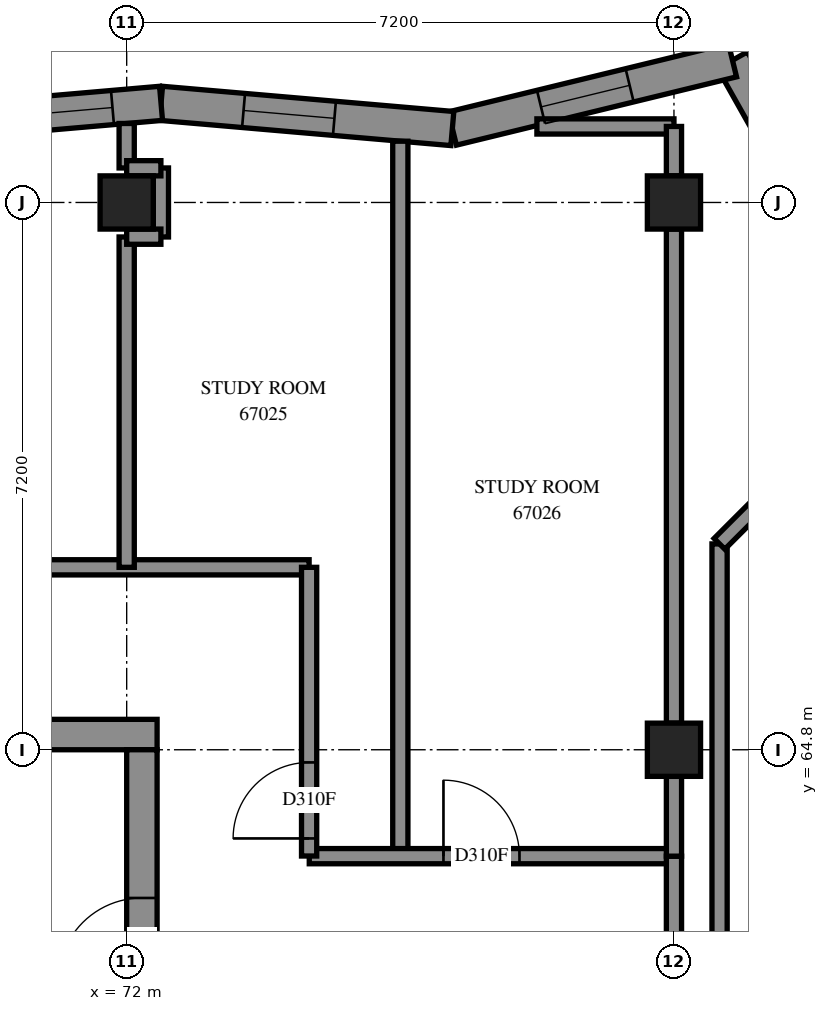
"""IFC4 building model, lengths in metres.
Left out: names, types, materials, properties, quantities, classifications, styles, units other than length and angle.
Written with IfcOpenShell. Run it as: python <this file> out.ifc"""

import sys

from ifc_helpers import new_model, si_unit, direction, frame, frame_2d, origin, origin_2d, place, context, subcontext, project, spatial, polyline, rectangle, outline, extrude, element, fill, save


model = new_model("IFC4")
c1 = context("Model", 3, precision=1e-05, world=origin(), true_north=direction((0.0, 1.0)))
c2 = subcontext(c1, "Body", "Model", "MODEL_VIEW")
j1 = project(units=[si_unit("LENGTHUNIT", "METRE"), si_unit("PLANEANGLEUNIT", "RADIAN")], contexts=[c1])
p1 = place(None, origin())
s1 = spatial("IfcSite", under=j1, at=p1, CompositionType="ELEMENT")
p2 = place(p1, origin())
s2 = spatial("IfcBuilding", under=s1, at=p2, CompositionType="ELEMENT")
p3 = place(p2, frame((0.0, 0.0, 247.2)))
s3 = spatial("IfcBuildingStorey", under=s2, at=p3, CompositionType="ELEMENT", Elevation=247.2)
for number, where, z_axis, x_axis in (
    (1, (72.0, 72.0, 0.0), (0.0, 0.0, 1.0), (1.0, 0.0, 0.0)),
    (2, (79.2, 64.8, 0.0), (0.0, 0.0, 1.0), (1.0, 0.0, 0.0)),
    (3, (79.2, 72.0, 0.0), (0.0, 0.0, 1.0), (1.0, 0.0, 0.0)),
):
    element("IfcColumn", number, at=place(p3, frame(where, z_axis=z_axis, x_axis=x_axis)), inside=s3, PredefinedType="COLUMN", context=c2, shape_type="SweptSolid", body=[
        extrude(rectangle(XDim=0.7, YDim=0.7, at=origin_2d()), origin(), (0.0, 0.0, 1.0), 3.1),
    ])
p4 = place(p3, frame((57.2, 65.0, -0.3), z_axis=(0.0, 0.0, 1.0), x_axis=(1.0, 0.0, 0.0)))
e4 = element("IfcWall", 4, at=p4, inside=s3, PredefinedType="SHEAR", context=c2, shape_type="SweptSolid", body=[
    extrude(rectangle(XDim=15.2, YDim=0.4, at=frame_2d((7.6, 0.0))), origin(), (0.0, 0.0, 1.0), 2.7),
])
p5 = place(p4, frame((10.4, 0.0, 0.3)))
e5 = element("IfcOpeningElement", 5, at=p5, cuts=e4, PredefinedType="OPENING", context=c2, shape_type="SweptSolid", body=[
    extrude(rectangle(XDim=0.8, YDim=2.1, at=frame_2d((0.4, 1.05))), frame((0.0, 0.21, 0.0), z_axis=(0.0, -1.0, 0.0), x_axis=(1.0, 0.0, 0.0)), (0.0, 0.0, 1.0), 0.42),
])
p6 = place(p3, frame((72.2, 50.4, -0.3), z_axis=(0.0, 0.0, 1.0), x_axis=(0.0, 1.0, 0.0)))
e6 = element("IfcWall", 6, at=p6, inside=s3, PredefinedType="SHEAR", context=c2, shape_type="SweptSolid", body=[
    extrude(rectangle(XDim=14.4, YDim=0.4, at=frame_2d((7.2, 0.0))), origin(), (0.0, 0.0, 1.0), 2.7),
])
p7 = place(p6, frame((4.55, 0.0, 0.3)))
e7 = element("IfcOpeningElement", 7, at=p7, cuts=e6, PredefinedType="OPENING", context=c2, shape_type="SweptSolid", body=[
    extrude(rectangle(XDim=1.1, YDim=2.1, at=frame_2d((0.55, 1.05))), frame((0.0, 0.21, 0.0), z_axis=(0.0, -1.0, 0.0), x_axis=(1.0, 0.0, 0.0)), (0.0, 0.0, 1.0), 0.42),
])
p8 = place(p6, frame((11.35, 0.0, 0.3)))
e8 = element("IfcOpeningElement", 8, at=p8, cuts=e6, PredefinedType="OPENING", context=c2, shape_type="SweptSolid", body=[
    extrude(rectangle(XDim=1.1, YDim=2.1, at=frame_2d((0.55, 1.05))), frame((0.0, 0.21, 0.0), z_axis=(0.0, -1.0, 0.0), x_axis=(1.0, 0.0, 0.0)), (0.0, 0.0, 1.0), 0.42),
])
p9 = place(p3, frame((81.603, 70.972, 0.0), z_axis=(0.0, 0.0, 1.0), x_axis=(-0.4907277416, 0.8713129654, 0.0)))
e9 = element("IfcWall", 9, at=p9, inside=s3, PredefinedType="SOLIDWALL", context=c2, shape_type="SweptSolid", body=[
    extrude(outline(polyline([(0.042, -0.225), (3.498, -0.225), (3.157, 0.225), (-0.042, 0.225), (0.042, -0.225)])), origin(), (0.0, 0.0, 1.0), 3.1),
])
p10 = place(p9, frame((0.759, 0.0, 0.45)))
e10 = element("IfcOpeningElement", 10, at=p10, cuts=e9, PredefinedType="OPENING", context=c2, shape_type="SweptSolid", body=[
    extrude(rectangle(XDim=1.2, YDim=2.55, at=frame_2d((0.6, 1.275))), frame((0.0, 0.235, 0.0), z_axis=(0.0, -1.0, 0.0), x_axis=(1.0, 0.0, 0.0)), (0.0, 0.0, 1.0), 0.47),
])
p11 = place(p3, frame((79.97, 73.871, 0.0), z_axis=(0.0, 0.0, 1.0), x_axis=(-0.9715539303, -0.2368184125, 0.0)))
e11 = element("IfcWall", 11, at=p11, inside=s3, PredefinedType="SOLIDWALL", context=c2, shape_type="SweptSolid", body=[
    extrude(outline(polyline([(-0.171, -0.225), (3.756, -0.225), (3.83, 0.225), (0.171, 0.225), (-0.171, -0.225)])), origin(), (0.0, 0.0, 1.0), 3.1),
])
p12 = place(p11, frame((1.393, 0.0, 0.45)))
e12 = element("IfcOpeningElement", 12, at=p12, cuts=e11, PredefinedType="OPENING", context=c2, shape_type="SweptSolid", body=[
    extrude(rectangle(XDim=1.2, YDim=2.55, at=frame_2d((0.6, 1.275))), frame((0.0, 0.235, 0.0), z_axis=(0.0, -1.0, 0.0), x_axis=(1.0, 0.0, 0.0)), (0.0, 0.0, 1.0), 0.47),
])
p13 = place(p3, frame((76.285, 72.973, 0.0), z_axis=(0.0, 0.0, 1.0), x_axis=(-0.9962801831, 0.0861730629, 0.0)))
e13 = element("IfcWall", 13, at=p13, inside=s3, PredefinedType="SOLIDWALL", context=c2, shape_type="SweptSolid", body=[
    extrude(outline(polyline([(0.037, -0.225), (3.866, -0.225), (3.827, 0.225), (-0.037, 0.225), (0.037, -0.225)])), origin(), (0.0, 0.0, 1.0), 3.1),
])
p14 = place(p13, frame((1.557, 0.0, 0.45)))
e14 = element("IfcOpeningElement", 14, at=p14, cuts=e13, PredefinedType="OPENING", context=c2, shape_type="SweptSolid", body=[
    extrude(rectangle(XDim=1.2, YDim=2.55, at=frame_2d((0.6, 1.275))), frame((0.0, 0.235, 0.0), z_axis=(0.0, -1.0, 0.0), x_axis=(1.0, 0.0, 0.0)), (0.0, 0.0, 1.0), 0.47),
])
p15 = place(p3, frame((72.452, 73.304, 0.0), z_axis=(0.0, 0.0, 1.0), x_axis=(-0.9962800708, -0.0861743613, 0.0)))
e15 = element("IfcWall", 15, at=p15, inside=s3, PredefinedType="SOLIDWALL", context=c2, shape_type="SweptSolid", body=[
    extrude(outline(polyline([(-0.019, -0.225), (3.81, -0.225), (3.849, 0.225), (0.019, 0.225), (-0.019, -0.225)])), origin(), (0.0, 0.0, 1.0), 3.1),
])
p16 = place(p15, frame((0.641, 0.0, 0.45)))
e16 = element("IfcOpeningElement", 16, at=p16, cuts=e15, PredefinedType="OPENING", context=c2, shape_type="SweptSolid", body=[
    extrude(rectangle(XDim=2.8, YDim=2.55, at=frame_2d((1.4, 1.275))), frame((0.0, 0.235, 0.0), z_axis=(0.0, -1.0, 0.0), x_axis=(1.0, 0.0, 0.0)), (0.0, 0.0, 1.0), 0.47),
])
p17 = place(p3, frame((55.2, 67.2, 0.0), z_axis=(0.0, 0.0, 1.0), x_axis=(1.0, 0.0, 0.0)))
e17 = element("IfcWall", 17, at=p17, inside=s3, PredefinedType="PARTITIONING", context=c2, shape_type="SweptSolid", body=[
    extrude(rectangle(XDim=19.2, YDim=0.2, at=frame_2d((9.6, 0.0))), origin(), (0.0, 0.0, 1.0), 3.1),
])
p18 = place(p17, frame((6.299, 0.0, 0.0)))
e18 = element("IfcOpeningElement", 18, at=p18, cuts=e17, PredefinedType="OPENING", context=c2, shape_type="SweptSolid", body=[
    extrude(rectangle(XDim=0.9, YDim=2.1, at=frame_2d((0.45, 1.05))), frame((0.0, 0.11, 0.0), z_axis=(0.0, -1.0, 0.0), x_axis=(1.0, 0.0, 0.0)), (0.0, 0.0, 1.0), 0.22),
])
p19 = place(p17, frame((13.65, 0.0, 0.0)))
e19 = element("IfcOpeningElement", 19, at=p19, cuts=e17, PredefinedType="OPENING", context=c2, shape_type="SweptSolid", body=[
    extrude(rectangle(XDim=0.9, YDim=2.1, at=frame_2d((0.45, 1.05))), frame((0.0, 0.11, 0.0), z_axis=(0.0, -1.0, 0.0), x_axis=(1.0, 0.0, 0.0)), (0.0, 0.0, 1.0), 0.22),
])
p20 = place(p3, frame((79.8, 55.844, 0.0), z_axis=(0.0, 0.0, 1.0), x_axis=(0.0, 1.0, 0.0)))
e20 = element("IfcWall", 20, at=p20, inside=s3, PredefinedType="PARTITIONING", context=c2, shape_type="SweptSolid", body=[
    extrude(rectangle(XDim=11.664, YDim=0.2, at=frame_2d((5.832, 0.0))), origin(), (0.0, 0.0, 1.0), 3.1),
])
p21 = place(p3, frame((79.907, 55.739, 0.0), z_axis=(0.0, 0.0, 1.0), x_axis=(0.7071067812, 0.7071067812, 0.0)))
e21 = element("IfcWall", 21, at=p21, inside=s3, PredefinedType="PARTITIONING", context=c2, shape_type="SweptSolid", body=[
    extrude(rectangle(XDim=9.798, YDim=0.2, at=frame_2d((4.899, 0.0))), origin(), (0.0, 0.0, 1.0), 3.1),
])
p22 = place(p21, frame((0.617, 0.0, 0.0)))
e22 = element("IfcOpeningElement", 22, at=p22, cuts=e21, PredefinedType="OPENING", context=c2, shape_type="SweptSolid", body=[
    extrude(rectangle(XDim=1.0, YDim=2.1, at=frame_2d((0.5, 1.05))), frame((0.0, 0.11, 0.0), z_axis=(0.0, -1.0, 0.0), x_axis=(1.0, 0.0, 0.0)), (0.0, 0.0, 1.0), 0.22),
])
p23 = place(p3, frame((75.6, 63.4, 0.0), z_axis=(0.0, 0.0, 1.0), x_axis=(0.0, 1.0, 0.0)))
e23 = element("IfcWall", 23, at=p23, inside=s3, PredefinedType="PARTITIONING", context=c2, shape_type="SweptSolid", body=[
    extrude(rectangle(XDim=9.406, YDim=0.2, at=frame_2d((4.703, 0.0))), origin(), (0.0, 0.0, 1.0), 3.1),
])
p24 = place(p3, frame((79.2, 65.15, 0.0), z_axis=(0.0, 0.0, 1.0), x_axis=(0.0, 1.0, 0.0)))
e24 = element("IfcWall", 24, at=p24, inside=s3, PredefinedType="PARTITIONING", context=c2, shape_type="SweptSolid", body=[
    extrude(rectangle(XDim=6.5, YDim=0.2, at=frame_2d((3.25, 0.0))), origin(), (0.0, 0.0, 1.0), 3.1),
])
p25 = place(p3, frame((74.402, 63.4, 0.0), z_axis=(0.0, 0.0, 1.0), x_axis=(1.0, 0.0, 0.0)))
e25 = element("IfcWall", 25, at=p25, inside=s3, PredefinedType="PARTITIONING", context=c2, shape_type="SweptSolid", body=[
    extrude(rectangle(XDim=4.798, YDim=0.2, at=frame_2d((2.399, 0.0))), origin(), (0.0, 0.0, 1.0), 3.1),
])
p26 = place(p25, frame((1.766, 0.0, 0.0)))
e26 = element("IfcOpeningElement", 26, at=p26, cuts=e25, PredefinedType="OPENING", context=c2, shape_type="SweptSolid", body=[
    extrude(rectangle(XDim=1.0, YDim=2.1, at=frame_2d((0.5, 1.05))), frame((0.0, 0.11, 0.0), z_axis=(0.0, -1.0, 0.0), x_axis=(1.0, 0.0, 0.0)), (0.0, 0.0, 1.0), 0.22),
])
p27 = place(p3, frame((72.0, 67.2, 0.0), z_axis=(0.0, 0.0, 1.0), x_axis=(0.0, 1.0, 0.0)))
e27 = element("IfcWall", 27, at=p27, inside=s3, PredefinedType="PARTITIONING", context=c2, shape_type="SweptSolid", body=[
    extrude(rectangle(XDim=4.346, YDim=0.2, at=frame_2d((2.173, 0.0))), origin(), (0.0, 0.0, 1.0), 3.1),
])
p28 = place(p3, frame((74.4, 63.402, 0.0), z_axis=(0.0, 0.0, 1.0), x_axis=(0.0, 1.0, 0.0)))
e28 = element("IfcWall", 28, at=p28, inside=s3, PredefinedType="PARTITIONING", context=c2, shape_type="SweptSolid", body=[
    extrude(rectangle(XDim=3.798, YDim=0.2, at=frame_2d((1.899, 0.0))), origin(), (0.0, 0.0, 1.0), 3.1),
])
p29 = place(p28, frame((0.231, 0.0, 0.0)))
e29 = element("IfcOpeningElement", 29, at=p29, cuts=e28, PredefinedType="OPENING", context=c2, shape_type="SweptSolid", body=[
    extrude(rectangle(XDim=1.0, YDim=2.1, at=frame_2d((0.5, 1.05))), frame((0.0, 0.11, 0.0), z_axis=(0.0, -1.0, 0.0), x_axis=(1.0, 0.0, 0.0)), (0.0, 0.0, 1.0), 0.22),
])
p30 = place(p3, frame((79.799, 67.509, 0.0), z_axis=(0.0, 0.0, 1.0), x_axis=(0.7070929469, 0.7071206152, 0.0)))
e30 = element("IfcWall", 30, at=p30, inside=s3, PredefinedType="PARTITIONING", context=c2, shape_type="SweptSolid", body=[
    extrude(rectangle(XDim=3.614, YDim=0.2, at=frame_2d((1.807, 0.0))), origin(), (0.0, 0.0, 1.0), 3.1),
])
p31 = place(p3, frame((79.2, 61.4, 0.0), z_axis=(0.0, 0.0, 1.0), x_axis=(0.0, 1.0, 0.0)))
e31 = element("IfcWall", 31, at=p31, inside=s3, PredefinedType="PARTITIONING", context=c2, shape_type="SweptSolid", body=[
    extrude(rectangle(XDim=2.0, YDim=0.2, at=frame_2d((1.0, 0.0))), origin(), (0.0, 0.0, 1.0), 3.1),
])
p32 = place(p3, frame((77.397, 73.0, 0.0), z_axis=(0.0, 0.0, 1.0), x_axis=(1.0, 0.0, 0.0)))
e32 = element("IfcWall", 32, at=p32, inside=s3, PredefinedType="PARTITIONING", context=c2, shape_type="SweptSolid", body=[
    extrude(rectangle(XDim=1.803, YDim=0.2, at=frame_2d((0.902, 0.0))), origin(), (0.0, 0.0, 1.0), 3.1),
])
p33 = place(p3, frame((79.2, 63.4, 0.0), z_axis=(0.0, 0.0, 1.0), x_axis=(0.0, 1.0, 0.0)))
e33 = element("IfcWall", 33, at=p33, inside=s3, PredefinedType="PARTITIONING", context=c2, shape_type="SweptSolid", body=[
    extrude(rectangle(XDim=1.05, YDim=0.2, at=frame_2d((0.525, 0.0))), origin(), (0.0, 0.0, 1.0), 3.1),
])
p34 = place(p3, frame((72.45, 71.546, 0.0), z_axis=(0.0, 0.0, 1.0), x_axis=(0.0, 1.0, 0.0)))
e34 = element("IfcWall", 34, at=p34, inside=s3, PredefinedType="PARTITIONING", context=c2, shape_type="SweptSolid", body=[
    extrude(rectangle(XDim=0.908, YDim=0.2, at=frame_2d((0.454, 0.0))), origin(), (0.0, 0.0, 1.0), 3.1),
])
p35 = place(p3, frame((79.2, 72.35, 0.0), z_axis=(0.0, 0.0, 1.0), x_axis=(0.0, 1.0, 0.0)))
e35 = element("IfcWall", 35, at=p35, inside=s3, PredefinedType="PARTITIONING", context=c2, shape_type="SweptSolid", body=[
    extrude(rectangle(XDim=0.65, YDim=0.2, at=frame_2d((0.325, 0.0))), origin(), (0.0, 0.0, 1.0), 3.1),
])
p36 = place(p3, frame((72.0, 72.454, 0.0), z_axis=(0.0, 0.0, 1.0), x_axis=(0.0, 1.0, 0.0)))
e36 = element("IfcWall", 36, at=p36, inside=s3, PredefinedType="PARTITIONING", context=c2, shape_type="SweptSolid", body=[
    extrude(rectangle(XDim=0.585, YDim=0.2, at=frame_2d((0.293, 0.0))), origin(), (0.0, 0.0, 1.0), 3.1),
])
for number, where, z_axis, x_axis in (
    (37, (72.0, 71.55, 0.0), (0.0, 0.0, 1.0), (1.0, 0.0, 0.0)),
    (38, (72.0, 72.45, 0.0), (0.0, 0.0, 1.0), (1.0, 0.0, 0.0)),
):
    element("IfcWall", number, at=place(p3, frame(where, z_axis=z_axis, x_axis=x_axis)), inside=s3, PredefinedType="PARTITIONING", context=c2, shape_type="SweptSolid", body=[
        extrude(rectangle(XDim=0.45, YDim=0.2, at=frame_2d((0.225, 0.0))), origin(), (0.0, 0.0, 1.0), 3.1),
    ])
p37 = place(p12, origin())
e39 = element("IfcWindow", 39, at=p37, inside=s3, PartitioningType="SINGLE_PANEL", PredefinedType="WINDOW", context=c2, shape_type="SweptSolid", body=[
    extrude(rectangle(XDim=1.2, YDim=2.55, at=frame_2d((0.6, 1.275))), frame((0.0, 0.125, 0.0), z_axis=(0.0, -1.0, 0.0), x_axis=(1.0, 0.0, 0.0)), (0.0, 0.0, 1.0), 0.06),
])
fill(e12, e39)
p38 = place(p14, origin())
e40 = element("IfcWindow", 40, at=p38, inside=s3, PartitioningType="SINGLE_PANEL", PredefinedType="WINDOW", context=c2, shape_type="SweptSolid", body=[
    extrude(rectangle(XDim=1.2, YDim=2.55, at=frame_2d((0.6, 1.275))), frame((0.0, 0.205, 0.0), z_axis=(0.0, -1.0, 0.0), x_axis=(1.0, 0.0, 0.0)), (0.0, 0.0, 1.0), 0.06),
])
fill(e14, e40)
p39 = place(p16, origin())
e41 = element("IfcWindow", 41, at=p39, inside=s3, PartitioningType="SINGLE_PANEL", PredefinedType="WINDOW", context=c2, shape_type="SweptSolid", body=[
    extrude(rectangle(XDim=2.8, YDim=2.55, at=frame_2d((1.4, 1.275))), frame((0.0, 0.205, 0.0), z_axis=(0.0, -1.0, 0.0), x_axis=(1.0, 0.0, 0.0)), (0.0, 0.0, 1.0), 0.06),
])
fill(e16, e41)
p40 = place(p8, origin())
e42 = element("IfcDoor", 42, at=p40, inside=s3, OperationType="SINGLE_SWING_RIGHT", PredefinedType="DOOR", context=c2, shape_type="SweptSolid", body=[
    extrude(rectangle(XDim=1.1, YDim=2.1, at=frame_2d((0.55, 1.05))), frame((0.0, 0.025, 0.0), z_axis=(0.0, -1.0, 0.0), x_axis=(1.0, 0.0, 0.0)), (0.0, 0.0, 1.0), 0.05),
])
fill(e8, e42)
p41 = place(p29, origin())
e43 = element("IfcDoor", 43, at=p41, inside=s3, OperationType="SINGLE_SWING_RIGHT", PredefinedType="DOOR", context=c2, shape_type="SweptSolid", body=[
    extrude(rectangle(XDim=1.0, YDim=2.1, at=frame_2d((0.5, 1.05))), frame((0.0, 0.025, 0.0), z_axis=(0.0, -1.0, 0.0), x_axis=(1.0, 0.0, 0.0)), (0.0, 0.0, 1.0), 0.05),
])
fill(e29, e43)
p42 = place(p26, origin())
e44 = element("IfcDoor", 44, at=p42, inside=s3, OperationType="SINGLE_SWING_LEFT", PredefinedType="DOOR", context=c2, shape_type="SweptSolid", body=[
    extrude(rectangle(XDim=1.0, YDim=2.1, at=frame_2d((0.5, 1.05))), frame((0.0, 0.025, 0.0), z_axis=(0.0, -1.0, 0.0), x_axis=(1.0, 0.0, 0.0)), (0.0, 0.0, 1.0), 0.05),
])
fill(e26, e44)
save(model, sys.argv[1])
